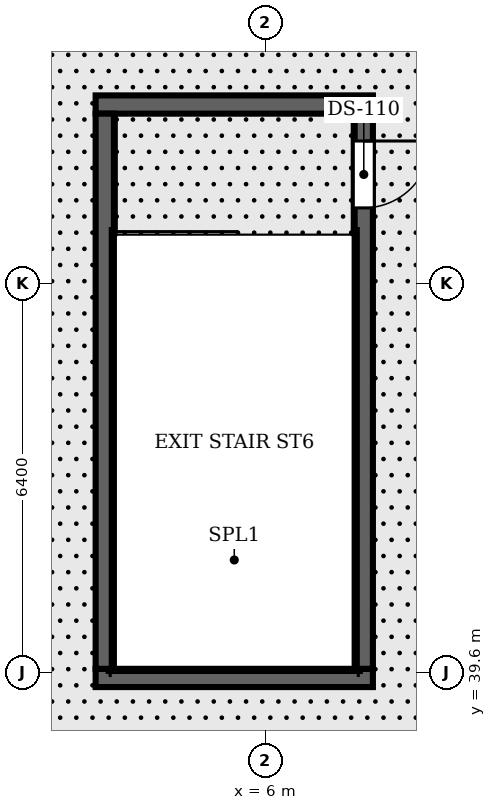
"""IFC4 building model, lengths in metres.
Left out: names, types, materials, properties, quantities, classifications, styles, units other than length and angle.
Written with IfcOpenShell. Run it as: python <this file> out.ifc"""

import sys

from ifc_helpers import new_model, si_unit, direction, frame, frame_2d, origin, place, context, subcontext, project, spatial, rectangle, extrude, element, fill, save


model = new_model("IFC4")
c1 = context("Model", 3, precision=1e-05, world=origin(), true_north=direction((0.0, 1.0)))
c2 = subcontext(c1, "Body", "Model", "MODEL_VIEW")
j1 = project(units=[si_unit("LENGTHUNIT", "METRE"), si_unit("PLANEANGLEUNIT", "RADIAN")], contexts=[c1])
p1 = place(None, origin())
s1 = spatial("IfcSite", under=j1, at=p1, CompositionType="ELEMENT")
p2 = place(p1, origin())
s2 = spatial("IfcBuilding", under=s1, at=p2, CompositionType="ELEMENT")
p3 = place(p2, frame((0.0, 0.0, 35.4)))
s3 = spatial("IfcBuildingStorey", under=s2, at=p3, CompositionType="ELEMENT", Elevation=35.4)
for number, where, z_axis, x_axis in (
    (1, (3.21, 39.51, 0.0), (0.0, 0.0, 1.0), (1.0, 0.0, 0.0)),
    (2, (3.21, 48.94, 0.0), (0.0, 0.0, 1.0), (1.0, 0.0, 0.0)),
):
    element("IfcWall", number, at=place(p3, frame(where, z_axis=z_axis, x_axis=x_axis)), inside=s3, PredefinedType="SHEAR", context=c2, shape_type="SweptSolid", body=[
        extrude(rectangle(XDim=4.56, YDim=0.3, at=frame_2d((2.28, 0.0))), origin(), (0.0, 0.0, 1.0), 4.8),
    ])
p4 = place(p3, frame((3.36, 39.66, 0.0), z_axis=(0.0, 0.0, 1.0), x_axis=(0.0, 1.0, 0.0)))
e3 = element("IfcWall", 3, at=p4, inside=s3, PredefinedType="SHEAR", context=c2, shape_type="SweptSolid", body=[
    extrude(rectangle(XDim=9.13, YDim=0.3, at=frame_2d((4.565, 0.0))), origin(), (0.0, 0.0, 1.0), 4.8),
])
p5 = place(p3, frame((7.62, 48.79, 0.0), z_axis=(0.0, 0.0, 1.0), x_axis=(0.0, -1.0, 0.0)))
e4 = element("IfcWall", 4, at=p5, inside=s3, PredefinedType="SHEAR", context=c2, shape_type="SweptSolid", body=[
    extrude(rectangle(XDim=9.13, YDim=0.3, at=frame_2d((4.565, 0.0))), origin(), (0.0, 0.0, 1.0), 4.8),
])
p6 = place(p5, frame((0.45, 0.0, 0.0)))
e5 = element("IfcOpeningElement", 5, at=p6, cuts=e4, PredefinedType="OPENING", context=c2, shape_type="SweptSolid", body=[
    extrude(rectangle(XDim=1.1, YDim=2.15, at=frame_2d((0.55, 1.075))), frame((0.0, 0.16, 0.0), z_axis=(0.0, -1.0, 0.0), x_axis=(1.0, 0.0, 0.0)), (0.0, 0.0, 1.0), 0.32),
])
p7 = place(p6, origin())
e6 = element("IfcDoor", 6, at=p7, inside=s3, OperationType="SINGLE_SWING_LEFT", PredefinedType="DOOR", context=c2, shape_type="SweptSolid", body=[
    extrude(rectangle(XDim=1.1, YDim=2.15, at=frame_2d((0.55, 1.075))), frame((0.0, 0.025, 0.0), z_axis=(0.0, -1.0, 0.0), x_axis=(1.0, 0.0, 0.0)), (0.0, 0.0, 1.0), 0.05),
])
fill(e5, e6)
save(model, sys.argv[1])
